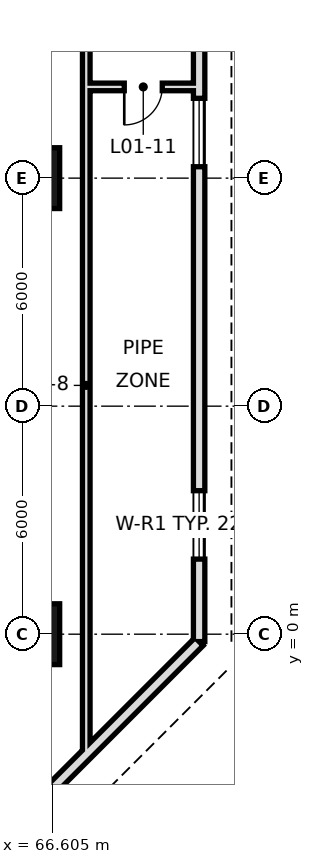
"""IFC4 building model, lengths in metres.
Left out: names, types, materials, properties, quantities, classifications, styles, units other than length and angle.
Written with IfcOpenShell. Run it as: python <this file> out.ifc"""

import sys

from ifc_helpers import new_model, si_unit, direction, frame, frame_2d, origin, origin_2d, place, context, subcontext, project, spatial, rectangle, hollow_rectangle, extrude, element, fill, save


model = new_model("IFC4")
c1 = context("Model", 3, precision=1e-05, world=origin(), true_north=direction((0.0, 1.0)))
c2 = subcontext(c1, "Body", "Model", "MODEL_VIEW")
j1 = project(units=[si_unit("LENGTHUNIT", "METRE"), si_unit("PLANEANGLEUNIT", "RADIAN")], contexts=[c1])
p1 = place(None, origin())
s1 = spatial("IfcSite", under=j1, at=p1, CompositionType="ELEMENT")
p2 = place(p1, origin())
s2 = spatial("IfcBuilding", under=s1, at=p2, CompositionType="ELEMENT")
p3 = place(p2, frame((0.0, 0.0, 15.0)))
s3 = spatial("IfcBuildingStorey", under=s2, at=p3, CompositionType="ELEMENT", Elevation=15.0)
for number, where, z_axis, x_axis in (
    (1, (66.0, 0.0, 0.0), (0.0, 0.0, 1.0), (1.0, 0.0, 0.0)),
    (2, (66.0, 12.0, 0.0), (0.0, 0.0, 1.0), (1.0, 0.0, 0.0)),
):
    element("IfcColumn", number, at=place(p3, frame(where, z_axis=z_axis, x_axis=x_axis)), inside=s3, PredefinedType="COLUMN", context=c2, shape_type="SweptSolid", body=[
        extrude(hollow_rectangle(XDim=1.6, YDim=1.6, WallThickness=0.07, at=origin_2d()), origin(), (0.0, 0.0, 1.0), 5.4),
    ])
p4 = place(p3, frame((64.195, -6.47, 0.0), z_axis=(0.0, 0.0, 1.0), x_axis=(0.707106781187, 0.707106781187, 0.0)))
e3 = element("IfcWall", 3, at=p4, inside=s3, PredefinedType="SOLIDWALL", context=c2, shape_type="SweptSolid", body=[
    extrude(rectangle(XDim=8.875, YDim=0.3, at=frame_2d((4.438, 0.0))), origin(), (0.0, 0.0, 1.0), 5.0),
])
p5 = place(p4, frame((1.292, 0.0, 0.9)))
e4 = element("IfcOpeningElement", 4, at=p5, cuts=e3, PredefinedType="OPENING", context=c2, shape_type="SweptSolid", body=[
    extrude(rectangle(XDim=1.8, YDim=1.5, at=frame_2d((0.9, 0.75))), frame((0.0, 0.16, 0.0), z_axis=(0.0, -1.0, 0.0), x_axis=(1.0, 0.0, 0.0)), (0.0, 0.0, 1.0), 0.32),
])
p6 = place(p3, frame((70.47, -0.195, 0.0), z_axis=(0.0, 0.0, 1.0), x_axis=(0.0, 1.0, 0.0)))
e5 = element("IfcWall", 5, at=p6, inside=s3, PredefinedType="SOLIDWALL", context=c2, shape_type="SweptSolid", body=[
    extrude(rectangle(XDim=46.389, YDim=0.3, at=frame_2d((23.195, 0.0))), origin(), (0.0, 0.0, 1.0), 5.0),
])
p7 = place(p6, frame((2.17, 0.0, 0.9)))
e6 = element("IfcOpeningElement", 6, at=p7, cuts=e5, PredefinedType="OPENING", context=c2, shape_type="SweptSolid", body=[
    extrude(rectangle(XDim=1.8, YDim=1.5, at=frame_2d((0.9, 0.75))), frame((0.0, 0.16, 0.0), z_axis=(0.0, -1.0, 0.0), x_axis=(1.0, 0.0, 0.0)), (0.0, 0.0, 1.0), 0.32),
])
p8 = place(p6, frame((12.495, 0.0, 0.9)))
e7 = element("IfcOpeningElement", 7, at=p8, cuts=e5, PredefinedType="OPENING", context=c2, shape_type="SweptSolid", body=[
    extrude(rectangle(XDim=1.8, YDim=1.5, at=frame_2d((0.9, 0.75))), frame((0.0, 0.16, 0.0), z_axis=(0.0, -1.0, 0.0), x_axis=(1.0, 0.0, 0.0)), (0.0, 0.0, 1.0), 0.32),
])
p9 = place(p6, frame((26.295, 0.0, 0.9)))
e8 = element("IfcOpeningElement", 8, at=p9, cuts=e5, PredefinedType="OPENING", context=c2, shape_type="SweptSolid", body=[
    extrude(rectangle(XDim=1.8, YDim=1.5, at=frame_2d((0.9, 0.75))), frame((0.0, 0.16, 0.0), z_axis=(0.0, -1.0, 0.0), x_axis=(1.0, 0.0, 0.0)), (0.0, 0.0, 1.0), 0.32),
])
p10 = place(p6, frame((38.295, 0.0, 0.9)))
e9 = element("IfcOpeningElement", 9, at=p10, cuts=e5, PredefinedType="OPENING", context=c2, shape_type="SweptSolid", body=[
    extrude(rectangle(XDim=1.8, YDim=1.5, at=frame_2d((0.9, 0.75))), frame((0.0, 0.16, 0.0), z_axis=(0.0, -1.0, 0.0), x_axis=(1.0, 0.0, 0.0)), (0.0, 0.0, 1.0), 0.32),
])
p11 = place(p3, frame((67.5, -3.207, 0.0), z_axis=(0.0, 0.0, 1.0), x_axis=(0.0, 1.0, 0.0)))
e10 = element("IfcWall", 10, at=p11, inside=s3, PredefinedType="SOLIDWALL", context=c2, shape_type="SweptSolid", body=[
    extrude(rectangle(XDim=19.507, YDim=0.2, at=frame_2d((9.753, 0.0))), origin(), (0.0, 0.0, 1.0), 3.2),
])
p12 = place(p3, frame((67.6, 14.4, 0.0), z_axis=(0.0, 0.0, 1.0), x_axis=(1.0, 0.0, 0.0)))
e11 = element("IfcWall", 11, at=p12, inside=s3, PredefinedType="SOLIDWALL", context=c2, shape_type="SweptSolid", body=[
    extrude(rectangle(XDim=2.9, YDim=0.2, at=frame_2d((1.45, 0.0))), origin(), (0.0, 0.0, 1.0), 5.0),
])
p13 = place(p12, frame((0.9, 0.0, 0.0)))
e12 = element("IfcOpeningElement", 12, at=p13, cuts=e11, PredefinedType="OPENING", context=c2, shape_type="SweptSolid", body=[
    extrude(rectangle(XDim=1.0, YDim=2.4, at=frame_2d((0.5, 1.2))), frame((0.0, 0.11, 0.0), z_axis=(0.0, -1.0, 0.0), x_axis=(1.0, 0.0, 0.0)), (0.0, 0.0, 1.0), 0.22),
])
p14 = place(p7, origin())
e13 = element("IfcWindow", 13, at=p14, inside=s3, PartitioningType="SINGLE_PANEL", PredefinedType="WINDOW", context=c2, shape_type="SweptSolid", body=[
    extrude(rectangle(XDim=1.8, YDim=1.5, at=frame_2d((0.9, 0.75))), frame((0.0, 0.03, 0.0), z_axis=(0.0, -1.0, 0.0), x_axis=(1.0, 0.0, 0.0)), (0.0, 0.0, 1.0), 0.06),
])
fill(e6, e13)
p15 = place(p8, origin())
e14 = element("IfcWindow", 14, at=p15, inside=s3, PartitioningType="SINGLE_PANEL", PredefinedType="WINDOW", context=c2, shape_type="SweptSolid", body=[
    extrude(rectangle(XDim=1.8, YDim=1.5, at=frame_2d((0.9, 0.75))), frame((0.0, 0.03, 0.0), z_axis=(0.0, -1.0, 0.0), x_axis=(1.0, 0.0, 0.0)), (0.0, 0.0, 1.0), 0.06),
])
fill(e7, e14)
p16 = place(p13, frame((1.0, 0.0, 0.0), z_axis=(0.0, 0.0, 1.0), x_axis=(-1.0, 0.0, 0.0)))
e15 = element("IfcDoor", 15, at=p16, inside=s3, OperationType="SINGLE_SWING_RIGHT", PredefinedType="DOOR", context=c2, shape_type="SweptSolid", body=[
    extrude(rectangle(XDim=1.0, YDim=2.4, at=frame_2d((0.5, 1.2))), frame((0.0, 0.025, 0.0), z_axis=(0.0, -1.0, 0.0), x_axis=(1.0, 0.0, 0.0)), (0.0, 0.0, 1.0), 0.05),
])
fill(e12, e15)
save(model, sys.argv[1])
